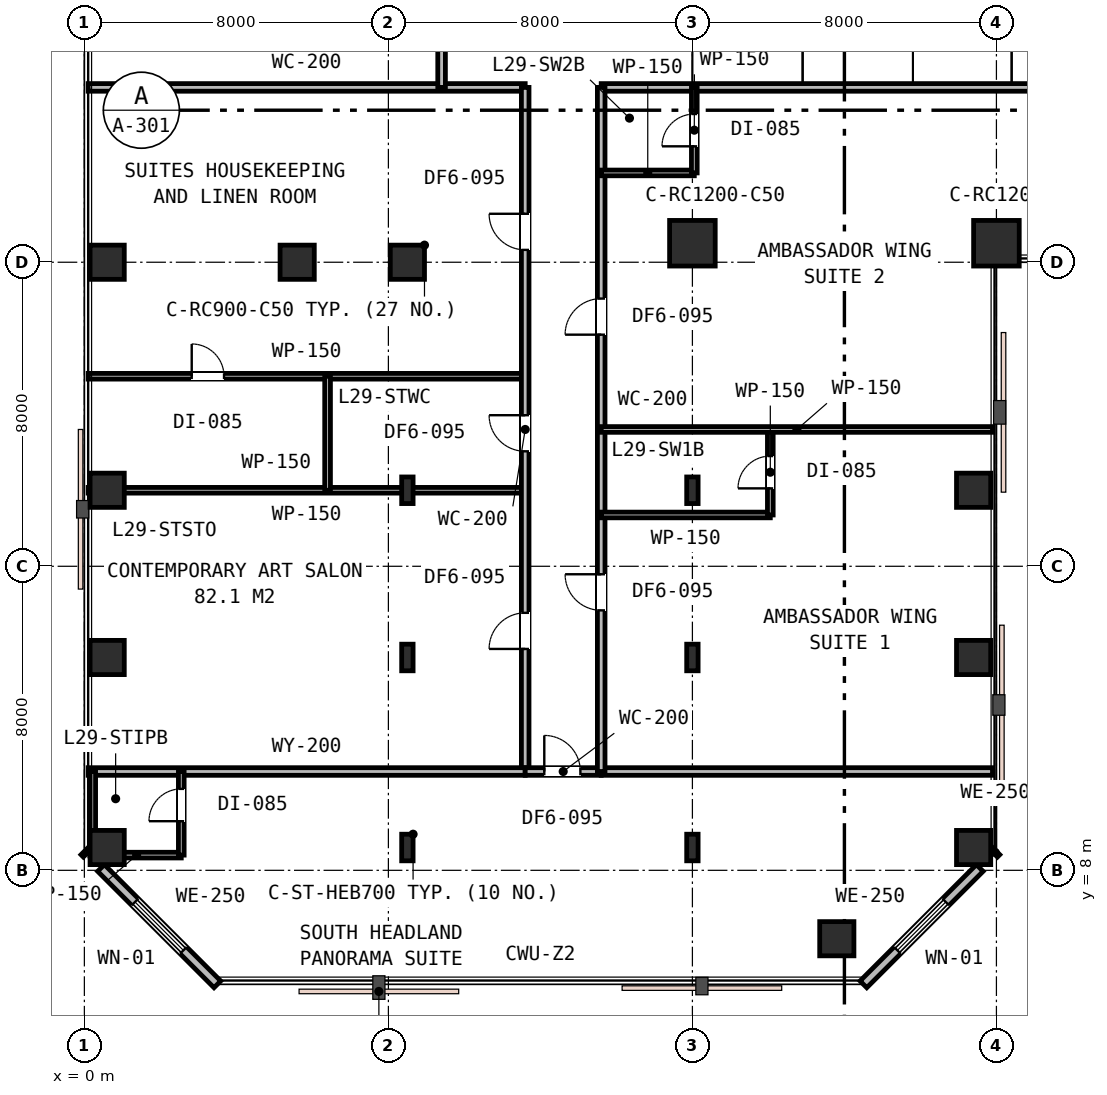
"""IFC4 building model, lengths in metres.
Left out: names, types, materials, properties, quantities, classifications, styles, units other than length and angle.
Written with IfcOpenShell. Run it as: python <this file> out.ifc"""

import sys

from ifc_helpers import new_model, si_unit, direction, frame, frame_2d, origin, origin_2d, place, context, subcontext, project, spatial, rectangle, i_section, extrude, element, fill, save


model = new_model("IFC4")
c1 = context("Model", 3, precision=1e-05, world=origin(), true_north=direction((0.0, 1.0)))
c2 = subcontext(c1, "Body", "Model", "MODEL_VIEW")
j1 = project(units=[si_unit("LENGTHUNIT", "METRE"), si_unit("PLANEANGLEUNIT", "RADIAN")], contexts=[c1])
p1 = place(None, origin())
s1 = spatial("IfcSite", under=j1, at=p1, CompositionType="ELEMENT")
p2 = place(p1, origin())
s2 = spatial("IfcBuilding", under=s1, at=p2, CompositionType="ELEMENT")
p3 = place(p2, frame((0.0, 0.0, 115.2)))
s3 = spatial("IfcBuildingStorey", under=s2, at=p3, CompositionType="ELEMENT", Elevation=115.2)
p4 = place(p3, frame((8.5, 24.0, 0.0), z_axis=(0.0, 0.0, 1.0), x_axis=(1.0, 0.0, 0.0)))
e1 = element("IfcColumn", 1, at=p4, inside=s3, PredefinedType="COLUMN", context=c2, shape_type="SweptSolid", body=[
    extrude(rectangle(XDim=0.9, YDim=0.9, at=origin_2d()), origin(), (0.0, 0.0, 1.0), 3.6),
])
for number, where, z_axis, x_axis in (
    (2, (16.0, 24.5, 0.0), (0.0, 0.0, 1.0), (1.0, 0.0, 0.0)),
    (3, (24.0, 24.5, 0.0), (0.0, 0.0, 1.0), (1.0, 0.0, 0.0)),
):
    element("IfcColumn", number, at=place(p3, frame(where, z_axis=z_axis, x_axis=x_axis)), inside=s3, PredefinedType="COLUMN", context=c2, shape_type="SweptSolid", body=[
        extrude(rectangle(XDim=1.2, YDim=1.2, at=origin_2d()), origin(), (0.0, 0.0, 1.0), 3.6),
    ])
for number, where, z_axis, x_axis in (
    (4, (5.6, 24.0, 0.0), (0.0, 0.0, 1.0), (1.0, 0.0, 0.0)),
    (5, (0.6, 24.0, 0.0), (0.0, 0.0, 1.0), (1.0, 0.0, 0.0)),
    (6, (0.6, 8.6, 0.0), (0.0, 0.0, 1.0), (1.0, 0.0, 0.0)),
    (7, (0.6, 13.6, 0.0), (0.0, 0.0, 1.0), (1.0, 0.0, 0.0)),
    (8, (0.6, 18.0, 0.0), (0.0, 0.0, 1.0), (1.0, 0.0, 0.0)),
    (9, (19.8, 6.2, 0.0), (0.0, 0.0, 1.0), (1.0, 0.0, 0.0)),
    (10, (23.4, 8.6, 0.0), (0.0, 0.0, 1.0), (1.0, 0.0, 0.0)),
    (11, (23.4, 13.6, 0.0), (0.0, 0.0, 1.0), (1.0, 0.0, 0.0)),
    (12, (23.4, 18.0, 0.0), (0.0, 0.0, 1.0), (1.0, 0.0, 0.0)),
):
    element("IfcColumn", number, at=place(p3, frame(where, z_axis=z_axis, x_axis=x_axis)), inside=s3, PredefinedType="COLUMN", context=c2, shape_type="SweptSolid", body=[
        extrude(rectangle(XDim=0.9, YDim=0.9, at=origin_2d()), origin(), (0.0, 0.0, 1.0), 3.6),
    ])
for number, where, z_axis, x_axis in (
    (13, (8.5, 8.6, 0.0), (0.0, 0.0, 1.0), (1.0, 0.0, 0.0)),
    (14, (16.0, 8.6, 0.0), (0.0, 0.0, 1.0), (1.0, 0.0, 0.0)),
    (15, (8.5, 13.6, 0.0), (0.0, 0.0, 1.0), (1.0, 0.0, 0.0)),
    (16, (16.0, 13.6, 0.0), (0.0, 0.0, 1.0), (1.0, 0.0, 0.0)),
    (17, (8.5, 18.0, 0.0), (0.0, 0.0, 1.0), (1.0, 0.0, 0.0)),
    (18, (16.0, 18.0, 0.0), (0.0, 0.0, 1.0), (1.0, 0.0, 0.0)),
):
    element("IfcColumn", number, at=place(p3, frame(where, z_axis=z_axis, x_axis=x_axis)), inside=s3, PredefinedType="COLUMN", context=c2, shape_type="SweptSolid", body=[
        extrude(i_section(OverallWidth=0.3, OverallDepth=0.7, WebThickness=0.017, FlangeThickness=0.032, FilletRadius=0.027, at=origin_2d()), origin(), (0.0, 0.0, 1.0), 3.6),
    ])
p5 = place(p3, frame((20.5, 5.0, 0.0), z_axis=(0.0, 0.0, 1.0), x_axis=(0.707106781187, 0.707106781187, 0.0)))
e19 = element("IfcWall", 19, at=p5, inside=s3, PredefinedType="STANDARD", context=c2, shape_type="SweptSolid", body=[
    extrude(rectangle(XDim=4.33, YDim=0.25, at=frame_2d((2.165, 0.0))), origin(), (0.0, 0.0, 1.0), 3.33),
])
p6 = place(p5, frame((1.265, 0.0, 0.75)))
e20 = element("IfcOpeningElement", 20, at=p6, cuts=e19, PredefinedType="OPENING", context=c2, shape_type="SweptSolid", body=[
    extrude(rectangle(XDim=1.8, YDim=1.85, at=frame_2d((0.9, 0.925))), frame((0.0, 0.135, 0.0), z_axis=(0.0, -1.0, 0.0), x_axis=(1.0, 0.0, 0.0)), (0.0, 0.0, 1.0), 0.27),
])
for number, where, z_axis, x_axis in (
    (21, (23.938, 8.438, 0.0), (0.0, 0.0, 1.0), (0.707, 0.707, 0.0)),
    (22, (0.0, 8.5, 0.0), (0.0, 0.0, 1.0), (0.707, -0.707, 0.0)),
):
    element("IfcWall", number, at=place(p3, frame(where, z_axis=z_axis, x_axis=x_axis)), inside=s3, PredefinedType="STANDARD", context=c2, shape_type="SweptSolid", body=[
        extrude(rectangle(XDim=0.087, YDim=0.25, at=frame_2d((0.044, 0.0))), origin(), (0.0, 0.0, 1.0), 3.33),
    ])
p7 = place(p3, frame((0.438, 8.062, 0.0), z_axis=(0.0, 0.0, 1.0), x_axis=(0.707106781187, -0.707106781187, 0.0)))
e23 = element("IfcWall", 23, at=p7, inside=s3, PredefinedType="STANDARD", context=c2, shape_type="SweptSolid", body=[
    extrude(rectangle(XDim=4.33, YDim=0.25, at=frame_2d((2.165, 0.0))), origin(), (0.0, 0.0, 1.0), 3.33),
])
p8 = place(p7, frame((1.265, 0.0, 0.75)))
e24 = element("IfcOpeningElement", 24, at=p8, cuts=e23, PredefinedType="OPENING", context=c2, shape_type="SweptSolid", body=[
    extrude(rectangle(XDim=1.8, YDim=1.85, at=frame_2d((0.9, 0.925))), frame((0.0, 0.135, 0.0), z_axis=(0.0, -1.0, 0.0), x_axis=(1.0, 0.0, 0.0)), (0.0, 0.0, 1.0), 0.27),
])
p9 = place(p3, frame((0.1, 28.6, 0.0), z_axis=(0.0, 0.0, 1.0), x_axis=(1.0, 0.0, 0.0)))
e25 = element("IfcWall", 25, at=p9, inside=s3, PredefinedType="PARTITIONING", context=c2, shape_type="SweptSolid", body=[
    extrude(rectangle(XDim=11.5, YDim=0.2, at=frame_2d((5.75, 0.0))), origin(), (0.0, 0.0, 1.0), 2.87),
])
p10 = place(p3, frame((13.6, 28.6, 0.0), z_axis=(0.0, 0.0, 1.0), x_axis=(1.0, 0.0, 0.0)))
e26 = element("IfcWall", 26, at=p10, inside=s3, PredefinedType="PARTITIONING", context=c2, shape_type="SweptSolid", body=[
    extrude(rectangle(XDim=30.6, YDim=0.2, at=frame_2d((15.3, 0.0))), origin(), (0.0, 0.0, 1.0), 2.87),
])
p11 = place(p10, frame((13.325, 0.0, 0.0)))
e27 = element("IfcOpeningElement", 27, at=p11, cuts=e26, PredefinedType="OPENING", context=c2, shape_type="SweptSolid", body=[
    extrude(rectangle(XDim=0.95, YDim=2.15, at=frame_2d((0.475, 1.075))), frame((0.0, 0.11, 0.0), z_axis=(0.0, -1.0, 0.0), x_axis=(1.0, 0.0, 0.0)), (0.0, 0.0, 1.0), 0.22),
])
p12 = place(p10, frame((18.761, 0.0, 0.0)))
e28 = element("IfcOpeningElement", 28, at=p12, cuts=e26, PredefinedType="OPENING", context=c2, shape_type="SweptSolid", body=[
    extrude(rectangle(XDim=0.95, YDim=2.15, at=frame_2d((0.475, 1.075))), frame((0.0, 0.11, 0.0), z_axis=(0.0, -1.0, 0.0), x_axis=(1.0, 0.0, 0.0)), (0.0, 0.0, 1.0), 0.22),
])
p13 = place(p10, frame((25.503, 0.0, 0.0)))
e29 = element("IfcOpeningElement", 29, at=p13, cuts=e26, PredefinedType="OPENING", context=c2, shape_type="SweptSolid", body=[
    extrude(rectangle(XDim=0.95, YDim=2.15, at=frame_2d((0.475, 1.075))), frame((0.0, 0.11, 0.0), z_axis=(0.0, -1.0, 0.0), x_axis=(1.0, 0.0, 0.0)), (0.0, 0.0, 1.0), 0.22),
])
p14 = place(p3, frame((0.1, 18.0, 0.0), z_axis=(0.0, 0.0, 1.0), x_axis=(1.0, 0.0, 0.0)))
e30 = element("IfcWall", 30, at=p14, inside=s3, PredefinedType="PARTITIONING", context=c2, shape_type="SweptSolid", body=[
    extrude(rectangle(XDim=11.5, YDim=0.15, at=frame_2d((5.75, 0.0))), origin(), (0.0, 0.0, 1.0), 2.87),
])
p15 = place(p3, frame((0.1, 21.0, 0.0), z_axis=(0.0, 0.0, 1.0), x_axis=(1.0, 0.0, 0.0)))
e31 = element("IfcWall", 31, at=p15, inside=s3, PredefinedType="PARTITIONING", context=c2, shape_type="SweptSolid", body=[
    extrude(rectangle(XDim=11.5, YDim=0.15, at=frame_2d((5.75, 0.0))), origin(), (0.0, 0.0, 1.0), 2.87),
])
p16 = place(p15, frame((2.725, 0.0, 0.0)))
e32 = element("IfcOpeningElement", 32, at=p16, cuts=e31, PredefinedType="OPENING", context=c2, shape_type="SweptSolid", body=[
    extrude(rectangle(XDim=0.85, YDim=2.15, at=frame_2d((0.425, 1.075))), frame((0.0, 0.085, 0.0), z_axis=(0.0, -1.0, 0.0), x_axis=(1.0, 0.0, 0.0)), (0.0, 0.0, 1.0), 0.17),
])
p17 = place(p3, frame((6.4, 18.0, 0.0), z_axis=(0.0, 0.0, 1.0), x_axis=(0.0, 1.0, 0.0)))
e33 = element("IfcWall", 33, at=p17, inside=s3, PredefinedType="PARTITIONING", context=c2, shape_type="SweptSolid", body=[
    extrude(rectangle(XDim=3.0, YDim=0.15, at=frame_2d((1.5, 0.0))), origin(), (0.0, 0.0, 1.0), 2.87),
])
p18 = place(p3, frame((11.6, 10.6, 0.0), z_axis=(0.0, 0.0, 1.0), x_axis=(0.0, 1.0, 0.0)))
e34 = element("IfcWall", 34, at=p18, inside=s3, PredefinedType="PARTITIONING", context=c2, shape_type="SweptSolid", body=[
    extrude(rectangle(XDim=18.0, YDim=0.2, at=frame_2d((9.0, 0.0))), origin(), (0.0, 0.0, 1.0), 2.87),
])
p19 = place(p18, frame((8.425, 0.0, 0.0)))
e35 = element("IfcOpeningElement", 35, at=p19, cuts=e34, PredefinedType="OPENING", context=c2, shape_type="SweptSolid", body=[
    extrude(rectangle(XDim=0.95, YDim=2.15, at=frame_2d((0.475, 1.075))), frame((0.0, 0.11, 0.0), z_axis=(0.0, -1.0, 0.0), x_axis=(1.0, 0.0, 0.0)), (0.0, 0.0, 1.0), 0.22),
])
p20 = place(p18, frame((13.725, 0.0, 0.0)))
e36 = element("IfcOpeningElement", 36, at=p20, cuts=e34, PredefinedType="OPENING", context=c2, shape_type="SweptSolid", body=[
    extrude(rectangle(XDim=0.95, YDim=2.15, at=frame_2d((0.475, 1.075))), frame((0.0, 0.11, 0.0), z_axis=(0.0, -1.0, 0.0), x_axis=(1.0, 0.0, 0.0)), (0.0, 0.0, 1.0), 0.22),
])
p21 = place(p18, frame((3.225, 0.0, 0.0)))
e37 = element("IfcOpeningElement", 37, at=p21, cuts=e34, PredefinedType="OPENING", context=c2, shape_type="SweptSolid", body=[
    extrude(rectangle(XDim=0.95, YDim=2.15, at=frame_2d((0.475, 1.075))), frame((0.0, 0.11, 0.0), z_axis=(0.0, -1.0, 0.0), x_axis=(1.0, 0.0, 0.0)), (0.0, 0.0, 1.0), 0.22),
])
p22 = place(p3, frame((9.4, 28.6, 0.0), z_axis=(0.0, 0.0, 1.0), x_axis=(0.0, 1.0, 0.0)))
e38 = element("IfcWall", 38, at=p22, inside=s3, PredefinedType="PARTITIONING", context=c2, shape_type="SweptSolid", body=[
    extrude(rectangle(XDim=12.9, YDim=0.2, at=frame_2d((6.45, 0.0))), origin(), (0.0, 0.0, 1.0), 2.87),
])
p23 = place(p22, frame((3.005, 0.0, 0.0)))
e39 = element("IfcOpeningElement", 39, at=p23, cuts=e38, PredefinedType="OPENING", context=c2, shape_type="SweptSolid", body=[
    extrude(rectangle(XDim=0.95, YDim=2.15, at=frame_2d((0.475, 1.075))), frame((0.0, 0.11, 0.0), z_axis=(0.0, -1.0, 0.0), x_axis=(1.0, 0.0, 0.0)), (0.0, 0.0, 1.0), 0.22),
])
p24 = place(p22, frame((6.025, 0.0, 0.0)))
e40 = element("IfcOpeningElement", 40, at=p24, cuts=e38, PredefinedType="OPENING", context=c2, shape_type="SweptSolid", body=[
    extrude(rectangle(XDim=0.95, YDim=2.15, at=frame_2d((0.475, 1.075))), frame((0.0, 0.11, 0.0), z_axis=(0.0, -1.0, 0.0), x_axis=(1.0, 0.0, 0.0)), (0.0, 0.0, 1.0), 0.22),
])
p25 = place(p22, frame((10.275, 0.0, 0.0)))
e41 = element("IfcOpeningElement", 41, at=p25, cuts=e38, PredefinedType="OPENING", context=c2, shape_type="SweptSolid", body=[
    extrude(rectangle(XDim=0.95, YDim=2.15, at=frame_2d((0.475, 1.075))), frame((0.0, 0.11, 0.0), z_axis=(0.0, -1.0, 0.0), x_axis=(1.0, 0.0, 0.0)), (0.0, 0.0, 1.0), 0.22),
])
p26 = place(p3, frame((0.1, 10.6, 0.0), z_axis=(0.0, 0.0, 1.0), x_axis=(1.0, 0.0, 0.0)))
e42 = element("IfcWall", 42, at=p26, inside=s3, PredefinedType="PARTITIONING", context=c2, shape_type="SweptSolid", body=[
    extrude(rectangle(XDim=11.5, YDim=0.2, at=frame_2d((5.75, 0.0))), origin(), (0.0, 0.0, 1.0), 2.87),
])
p27 = place(p3, frame((13.6, 10.6, 0.0), z_axis=(0.0, 0.0, 1.0), x_axis=(1.0, 0.0, 0.0)))
e43 = element("IfcWall", 43, at=p27, inside=s3, PredefinedType="PARTITIONING", context=c2, shape_type="SweptSolid", body=[
    extrude(rectangle(XDim=10.3, YDim=0.2, at=frame_2d((5.15, 0.0))), origin(), (0.0, 0.0, 1.0), 2.87),
])
p28 = place(p3, frame((11.6, 10.6, 0.0), z_axis=(0.0, 0.0, 1.0), x_axis=(1.0, 0.0, 0.0)))
e44 = element("IfcWall", 44, at=p28, inside=s3, PredefinedType="PARTITIONING", context=c2, shape_type="SweptSolid", body=[
    extrude(rectangle(XDim=2.0, YDim=0.2, at=frame_2d((1.0, 0.0))), origin(), (0.0, 0.0, 1.0), 3.01),
])
p29 = place(p28, frame((0.502, 0.0, 0.0)))
e45 = element("IfcOpeningElement", 45, at=p29, cuts=e44, PredefinedType="OPENING", context=c2, shape_type="SweptSolid", body=[
    extrude(rectangle(XDim=0.95, YDim=2.15, at=frame_2d((0.475, 1.075))), frame((0.0, 0.11, 0.0), z_axis=(0.0, -1.0, 0.0), x_axis=(1.0, 0.0, 0.0)), (0.0, 0.0, 1.0), 0.22),
])
p30 = place(p3, frame((0.2, 8.4, 0.0), z_axis=(0.0, 0.0, 1.0), x_axis=(1.0, 0.0, 0.0)))
e46 = element("IfcWall", 46, at=p30, inside=s3, PredefinedType="PARTITIONING", context=c2, shape_type="SweptSolid", body=[
    extrude(rectangle(XDim=2.35, YDim=0.15, at=frame_2d((1.175, 0.0))), origin(), (0.0, 0.0, 1.0), 2.87),
])
p31 = place(p3, frame((2.55, 8.4, 0.0), z_axis=(0.0, 0.0, 1.0), x_axis=(0.0, 1.0, 0.0)))
e47 = element("IfcWall", 47, at=p31, inside=s3, PredefinedType="PARTITIONING", context=c2, shape_type="SweptSolid", body=[
    extrude(rectangle(XDim=2.2, YDim=0.15, at=frame_2d((1.1, 0.0))), origin(), (0.0, 0.0, 1.0), 2.87),
])
p32 = place(p31, frame((0.892, 0.0, 0.0)))
e48 = element("IfcOpeningElement", 48, at=p32, cuts=e47, PredefinedType="OPENING", context=c2, shape_type="SweptSolid", body=[
    extrude(rectangle(XDim=0.85, YDim=2.15, at=frame_2d((0.425, 1.075))), frame((0.0, 0.085, 0.0), z_axis=(0.0, -1.0, 0.0), x_axis=(1.0, 0.0, 0.0)), (0.0, 0.0, 1.0), 0.17),
])
p33 = place(p3, frame((0.22, 8.38, 0.0), z_axis=(0.0, 0.0, 1.0), x_axis=(0.0, 1.0, 0.0)))
e49 = element("IfcWall", 49, at=p33, inside=s3, PredefinedType="PARTITIONING", context=c2, shape_type="SweptSolid", body=[
    extrude(rectangle(XDim=2.22, YDim=0.15, at=frame_2d((1.11, 0.0))), origin(), (0.0, 0.0, 1.0), 2.87),
])
p34 = place(p3, frame((13.6, 10.6, 0.0), z_axis=(0.0, 0.0, 1.0), x_axis=(0.0, 1.0, 0.0)))
e50 = element("IfcWall", 50, at=p34, inside=s3, PredefinedType="PARTITIONING", context=c2, shape_type="SweptSolid", body=[
    extrude(rectangle(XDim=18.0, YDim=0.2, at=frame_2d((9.0, 0.0))), origin(), (0.0, 0.0, 1.0), 2.87),
])
p35 = place(p34, frame((4.24, 0.0, 0.0)))
e51 = element("IfcOpeningElement", 51, at=p35, cuts=e50, PredefinedType="OPENING", context=c2, shape_type="SweptSolid", body=[
    extrude(rectangle(XDim=0.95, YDim=2.15, at=frame_2d((0.475, 1.075))), frame((0.0, 0.11, 0.0), z_axis=(0.0, -1.0, 0.0), x_axis=(1.0, 0.0, 0.0)), (0.0, 0.0, 1.0), 0.22),
])
p36 = place(p34, frame((11.494, 0.0, 0.0)))
e52 = element("IfcOpeningElement", 52, at=p36, cuts=e50, PredefinedType="OPENING", context=c2, shape_type="SweptSolid", body=[
    extrude(rectangle(XDim=0.95, YDim=2.15, at=frame_2d((0.475, 1.075))), frame((0.0, 0.11, 0.0), z_axis=(0.0, -1.0, 0.0), x_axis=(1.0, 0.0, 0.0)), (0.0, 0.0, 1.0), 0.22),
])
p37 = place(p3, frame((13.6, 17.35, 0.0), z_axis=(0.0, 0.0, 1.0), x_axis=(1.0, 0.0, 0.0)))
e53 = element("IfcWall", 53, at=p37, inside=s3, PredefinedType="PARTITIONING", context=c2, shape_type="SweptSolid", body=[
    extrude(rectangle(XDim=4.45, YDim=0.15, at=frame_2d((2.225, 0.0))), origin(), (0.0, 0.0, 1.0), 2.87),
])
p38 = place(p3, frame((18.05, 17.35, 0.0), z_axis=(0.0, 0.0, 1.0), x_axis=(0.0, 1.0, 0.0)))
e54 = element("IfcWall", 54, at=p38, inside=s3, PredefinedType="PARTITIONING", context=c2, shape_type="SweptSolid", body=[
    extrude(rectangle(XDim=2.25, YDim=0.15, at=frame_2d((1.125, 0.0))), origin(), (0.0, 0.0, 1.0), 2.87),
])
p39 = place(p38, frame((0.7, 0.0, 0.0)))
e55 = element("IfcOpeningElement", 55, at=p39, cuts=e54, PredefinedType="OPENING", context=c2, shape_type="SweptSolid", body=[
    extrude(rectangle(XDim=0.85, YDim=2.15, at=frame_2d((0.425, 1.075))), frame((0.0, 0.085, 0.0), z_axis=(0.0, -1.0, 0.0), x_axis=(1.0, 0.0, 0.0)), (0.0, 0.0, 1.0), 0.17),
])
p40 = place(p3, frame((13.6, 19.6, 0.0), z_axis=(0.0, 0.0, 1.0), x_axis=(1.0, 0.0, 0.0)))
e56 = element("IfcWall", 56, at=p40, inside=s3, PredefinedType="PARTITIONING", context=c2, shape_type="SweptSolid", body=[
    extrude(rectangle(XDim=10.3, YDim=0.15, at=frame_2d((5.15, 0.0))), origin(), (0.0, 0.0, 1.0), 2.87),
])
p41 = place(p3, frame((13.6, 26.35, 0.0), z_axis=(0.0, 0.0, 1.0), x_axis=(1.0, 0.0, 0.0)))
e57 = element("IfcWall", 57, at=p41, inside=s3, PredefinedType="PARTITIONING", context=c2, shape_type="SweptSolid", body=[
    extrude(rectangle(XDim=2.45, YDim=0.15, at=frame_2d((1.225, 0.0))), origin(), (0.0, 0.0, 1.0), 2.87),
])
p42 = place(p3, frame((16.05, 26.35, 0.0), z_axis=(0.0, 0.0, 1.0), x_axis=(0.0, 1.0, 0.0)))
e58 = element("IfcWall", 58, at=p42, inside=s3, PredefinedType="PARTITIONING", context=c2, shape_type="SweptSolid", body=[
    extrude(rectangle(XDim=2.25, YDim=0.15, at=frame_2d((1.125, 0.0))), origin(), (0.0, 0.0, 1.0), 2.87),
])
p43 = place(p42, frame((0.7, 0.0, 0.0)))
e59 = element("IfcOpeningElement", 59, at=p43, cuts=e58, PredefinedType="OPENING", context=c2, shape_type="SweptSolid", body=[
    extrude(rectangle(XDim=0.85, YDim=2.15, at=frame_2d((0.425, 1.075))), frame((0.0, 0.085, 0.0), z_axis=(0.0, -1.0, 0.0), x_axis=(1.0, 0.0, 0.0)), (0.0, 0.0, 1.0), 0.17),
])
p44 = place(p6, origin())
e60 = element("IfcWindow", 60, at=p44, inside=s3, PartitioningType="SINGLE_PANEL", PredefinedType="WINDOW", context=c2, shape_type="SweptSolid", body=[
    extrude(rectangle(XDim=1.8, YDim=1.85, at=frame_2d((0.9, 0.925))), frame((0.0, 0.03, 0.0), z_axis=(0.0, -1.0, 0.0), x_axis=(1.0, 0.0, 0.0)), (0.0, 0.0, 1.0), 0.06),
])
fill(e20, e60)
p45 = place(p8, origin())
e61 = element("IfcWindow", 61, at=p45, inside=s3, PartitioningType="SINGLE_PANEL", PredefinedType="WINDOW", context=c2, shape_type="SweptSolid", body=[
    extrude(rectangle(XDim=1.8, YDim=1.85, at=frame_2d((0.9, 0.925))), frame((0.0, 0.03, 0.0), z_axis=(0.0, -1.0, 0.0), x_axis=(1.0, 0.0, 0.0)), (0.0, 0.0, 1.0), 0.06),
])
fill(e24, e61)
p46 = place(p19, origin())
e62 = element("IfcDoor", 62, at=p46, inside=s3, OperationType="SINGLE_SWING_RIGHT", PredefinedType="DOOR", context=c2, shape_type="SweptSolid", body=[
    extrude(rectangle(XDim=0.95, YDim=2.15, at=frame_2d((0.475, 1.075))), frame((0.0, 0.025, 0.0), z_axis=(0.0, -1.0, 0.0), x_axis=(1.0, 0.0, 0.0)), (0.0, 0.0, 1.0), 0.05),
])
fill(e35, e62)
p47 = place(p16, origin())
e63 = element("IfcDoor", 63, at=p47, inside=s3, OperationType="SINGLE_SWING_LEFT", PredefinedType="DOOR", context=c2, shape_type="SweptSolid", body=[
    extrude(rectangle(XDim=0.85, YDim=2.15, at=frame_2d((0.425, 1.075))), frame((0.0, 0.025, 0.0), z_axis=(0.0, -1.0, 0.0), x_axis=(1.0, 0.0, 0.0)), (0.0, 0.0, 1.0), 0.05),
])
fill(e32, e63)
p48 = place(p20, origin())
e64 = element("IfcDoor", 64, at=p48, inside=s3, OperationType="SINGLE_SWING_RIGHT", PredefinedType="DOOR", context=c2, shape_type="SweptSolid", body=[
    extrude(rectangle(XDim=0.95, YDim=2.15, at=frame_2d((0.475, 1.075))), frame((0.0, 0.025, 0.0), z_axis=(0.0, -1.0, 0.0), x_axis=(1.0, 0.0, 0.0)), (0.0, 0.0, 1.0), 0.05),
])
fill(e36, e64)
p49 = place(p21, origin())
e65 = element("IfcDoor", 65, at=p49, inside=s3, OperationType="SINGLE_SWING_LEFT", PredefinedType="DOOR", context=c2, shape_type="SweptSolid", body=[
    extrude(rectangle(XDim=0.95, YDim=2.15, at=frame_2d((0.475, 1.075))), frame((0.0, 0.025, 0.0), z_axis=(0.0, -1.0, 0.0), x_axis=(1.0, 0.0, 0.0)), (0.0, 0.0, 1.0), 0.05),
])
fill(e37, e65)
p50 = place(p29, origin())
e66 = element("IfcDoor", 66, at=p50, inside=s3, OperationType="SINGLE_SWING_LEFT", PredefinedType="DOOR", context=c2, shape_type="SweptSolid", body=[
    extrude(rectangle(XDim=0.95, YDim=2.15, at=frame_2d((0.475, 1.075))), frame((0.0, 0.025, 0.0), z_axis=(0.0, -1.0, 0.0), x_axis=(1.0, 0.0, 0.0)), (0.0, 0.0, 1.0), 0.05),
])
fill(e45, e66)
p51 = place(p32, origin())
e67 = element("IfcDoor", 67, at=p51, inside=s3, OperationType="SINGLE_SWING_LEFT", PredefinedType="DOOR", context=c2, shape_type="SweptSolid", body=[
    extrude(rectangle(XDim=0.85, YDim=2.15, at=frame_2d((0.425, 1.075))), frame((0.0, 0.025, 0.0), z_axis=(0.0, -1.0, 0.0), x_axis=(1.0, 0.0, 0.0)), (0.0, 0.0, 1.0), 0.05),
])
fill(e48, e67)
p52 = place(p35, origin())
e68 = element("IfcDoor", 68, at=p52, inside=s3, OperationType="SINGLE_SWING_RIGHT", PredefinedType="DOOR", context=c2, shape_type="SweptSolid", body=[
    extrude(rectangle(XDim=0.95, YDim=2.15, at=frame_2d((0.475, 1.075))), frame((0.0, 0.025, 0.0), z_axis=(0.0, -1.0, 0.0), x_axis=(1.0, 0.0, 0.0)), (0.0, 0.0, 1.0), 0.05),
])
fill(e51, e68)
p53 = place(p39, origin())
e69 = element("IfcDoor", 69, at=p53, inside=s3, OperationType="SINGLE_SWING_LEFT", PredefinedType="DOOR", context=c2, shape_type="SweptSolid", body=[
    extrude(rectangle(XDim=0.85, YDim=2.15, at=frame_2d((0.425, 1.075))), frame((0.0, 0.025, 0.0), z_axis=(0.0, -1.0, 0.0), x_axis=(1.0, 0.0, 0.0)), (0.0, 0.0, 1.0), 0.05),
])
fill(e55, e69)
p54 = place(p36, origin())
e70 = element("IfcDoor", 70, at=p54, inside=s3, OperationType="SINGLE_SWING_LEFT", PredefinedType="DOOR", context=c2, shape_type="SweptSolid", body=[
    extrude(rectangle(XDim=0.95, YDim=2.15, at=frame_2d((0.475, 1.075))), frame((0.0, 0.025, 0.0), z_axis=(0.0, -1.0, 0.0), x_axis=(1.0, 0.0, 0.0)), (0.0, 0.0, 1.0), 0.05),
])
fill(e52, e70)
p55 = place(p43, origin())
e71 = element("IfcDoor", 71, at=p55, inside=s3, OperationType="SINGLE_SWING_LEFT", PredefinedType="DOOR", context=c2, shape_type="SweptSolid", body=[
    extrude(rectangle(XDim=0.85, YDim=2.15, at=frame_2d((0.425, 1.075))), frame((0.0, 0.025, 0.0), z_axis=(0.0, -1.0, 0.0), x_axis=(1.0, 0.0, 0.0)), (0.0, 0.0, 1.0), 0.05),
])
fill(e59, e71)
save(model, sys.argv[1])
